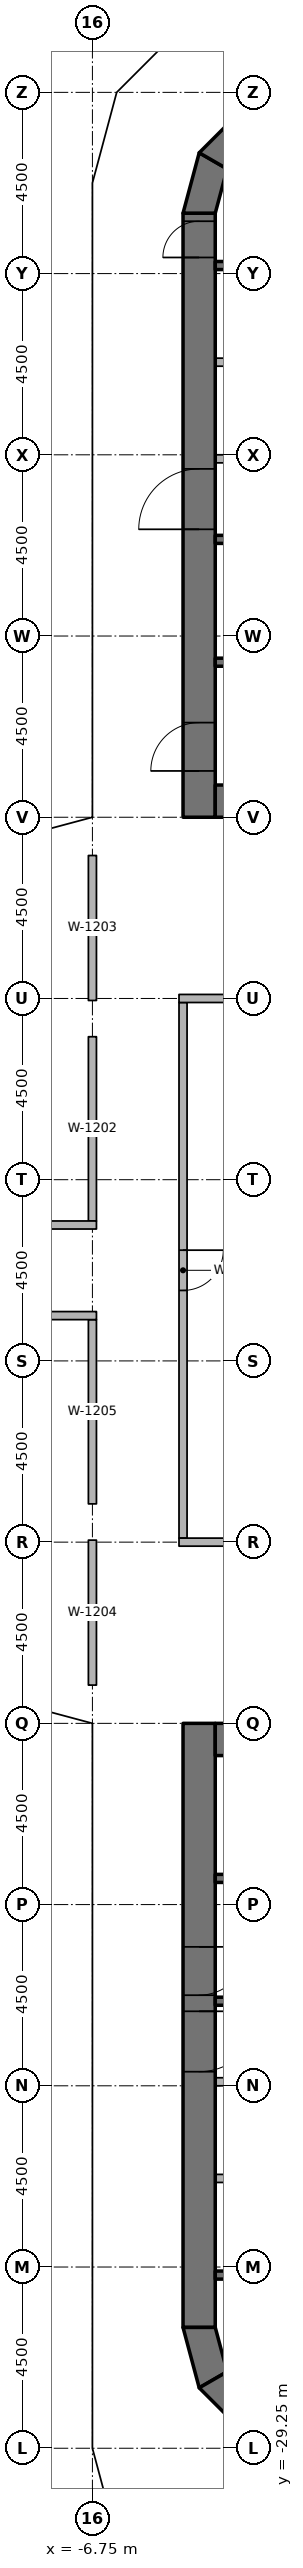
"""IFC4 building model, lengths in metres.
Left out: names, types, materials, properties, quantities, classifications, styles, units other than length and angle.
Written with IfcOpenShell. Run it as: python <this file> out.ifc"""

import sys

from ifc_helpers import new_model, si_unit, direction, frame, frame_2d, origin, origin_2d, place, context, subcontext, project, spatial, polyline, rectangle, outline, extrude, element, fill, save


model = new_model("IFC4")
c1 = context("Model", 3, precision=1e-05, world=origin(), true_north=direction((0.0, 1.0)))
c2 = subcontext(c1, "Body", "Model", "MODEL_VIEW")
j1 = project(units=[si_unit("LENGTHUNIT", "METRE"), si_unit("PLANEANGLEUNIT", "RADIAN")], contexts=[c1])
p1 = place(None, origin())
s1 = spatial("IfcSite", under=j1, at=p1, CompositionType="ELEMENT")
p2 = place(p1, origin())
s2 = spatial("IfcBuilding", under=s1, at=p2, CompositionType="ELEMENT")
p3 = place(p2, frame((0.0, 0.0, 128.4)))
s3 = spatial("IfcBuildingStorey", under=s2, at=p3, CompositionType="ELEMENT", Elevation=128.4)
for number, where, z_axis, x_axis in (
    (1, (-6.25, -26.9, 0.0), (0.0, 0.0, 1.0), (1.0, 0.0, 0.0)),
    (2, (-6.25, -24.65, 0.0), (0.0, 0.0, 1.0), (1.0, 0.0, 0.0)),
    (3, (-6.25, -20.25, 0.0), (0.0, 0.0, 1.0), (1.0, 0.0, 0.0)),
    (4, (-6.25, -15.75, 0.0), (0.0, 0.0, 1.0), (1.0, 0.0, 0.0)),
    (5, (-6.25, -10.75, 0.0), (0.0, 0.0, 1.0), (1.0, 0.0, 0.0)),
    (6, (-6.25, -6.25, 0.0), (0.0, 0.0, 1.0), (1.0, 0.0, 0.0)),
    (7, (-6.25, 6.25, 0.0), (0.0, 0.0, 1.0), (1.0, 0.0, 0.0)),
    (8, (-6.25, 10.75, 0.0), (0.0, 0.0, 1.0), (1.0, 0.0, 0.0)),
    (9, (-6.25, 15.75, 0.0), (0.0, 0.0, 1.0), (1.0, 0.0, 0.0)),
    (10, (-6.25, 20.25, 0.0), (0.0, 0.0, 1.0), (1.0, 0.0, 0.0)),
    (11, (-6.25, 24.65, 0.0), (0.0, 0.0, 1.0), (1.0, 0.0, 0.0)),
    (12, (-6.25, 26.7, 0.0), (0.0, 0.0, 1.0), (1.0, 0.0, 0.0)),
):
    element("IfcColumn", number, at=place(p3, frame(where, z_axis=z_axis, x_axis=x_axis)), inside=s3, PredefinedType="COLUMN", context=c2, shape_type="SweptSolid", body=[
        extrude(rectangle(XDim=0.9, YDim=0.9, at=origin_2d()), origin(), (0.0, 0.0, 1.0), 3.65),
    ])
p4 = place(p3, frame((-4.1, 11.25, 0.0), z_axis=(0.0, 0.0, 1.0), x_axis=(0.0, 1.0, 0.0)))
e13 = element("IfcWall", 13, at=p4, inside=s3, PredefinedType="SHEAR", context=c2, shape_type="SweptSolid", body=[
    extrude(rectangle(XDim=15.0, YDim=0.8, at=frame_2d((7.5, 0.0))), origin(), (0.0, 0.0, 1.0), 3.8),
])
p5 = place(p4, frame((7.15, 0.0, 0.0)))
e14 = element("IfcOpeningElement", 14, at=p5, cuts=e13, PredefinedType="OPENING", context=c2, shape_type="SweptSolid", body=[
    extrude(rectangle(XDim=1.5, YDim=2.3, at=frame_2d((0.75, 1.15))), frame((0.0, 0.41, 0.0), z_axis=(0.0, -1.0, 0.0), x_axis=(1.0, 0.0, 0.0)), (0.0, 0.0, 1.0), 0.82),
])
p6 = place(p4, frame((13.9, 0.0, 0.0)))
e15 = element("IfcOpeningElement", 15, at=p6, cuts=e13, PredefinedType="OPENING", context=c2, shape_type="SweptSolid", body=[
    extrude(rectangle(XDim=0.9, YDim=2.1, at=frame_2d((0.45, 1.05))), frame((0.0, 0.41, 0.0), z_axis=(0.0, -1.0, 0.0), x_axis=(1.0, 0.0, 0.0)), (0.0, 0.0, 1.0), 0.82),
])
p7 = place(p4, frame((1.15, 0.0, 0.0)))
e16 = element("IfcOpeningElement", 16, at=p7, cuts=e13, PredefinedType="OPENING", context=c2, shape_type="SweptSolid", body=[
    extrude(rectangle(XDim=1.2, YDim=2.1, at=frame_2d((0.6, 1.05))), frame((0.0, 0.41, 0.0), z_axis=(0.0, -1.0, 0.0), x_axis=(1.0, 0.0, 0.0)), (0.0, 0.0, 1.0), 0.82),
])
p8 = place(p3, frame((-3.7, 11.65, 0.0), z_axis=(0.0, 0.0, 1.0), x_axis=(1.0, 0.0, 0.0)))
e17 = element("IfcWall", 17, at=p8, inside=s3, PredefinedType="SHEAR", context=c2, shape_type="SweptSolid", body=[
    extrude(rectangle(XDim=7.4, YDim=0.8, at=frame_2d((3.7, 0.0))), origin(), (0.0, 0.0, 1.0), 3.8),
])
p9 = place(p3, origin())
e18 = element("IfcWall", 18, at=p9, inside=s3, PredefinedType="SHEAR", context=c2, shape_type="SweptSolid", body=[
    extrude(outline(polyline([(-4.5, 26.25), (-4.098, 27.75), (-3.405, 27.35), (-3.7, 26.25), (-4.5, 26.25)])), origin(), (0.0, 0.0, 1.0), 3.8),
])
p10 = place(p3, origin())
e19 = element("IfcWall", 19, at=p10, inside=s3, PredefinedType="SHEAR", context=c2, shape_type="SweptSolid", body=[
    extrude(outline(polyline([(-4.098, 27.75), (-3.0, 28.848), (-2.6, 28.155), (-3.405, 27.35), (-4.098, 27.75)])), origin(), (0.0, 0.0, 1.0), 3.8),
])
p11 = place(p3, frame((-4.1, -11.25, 0.0), z_axis=(0.0, 0.0, 1.0), x_axis=(0.0, -1.0, 0.0)))
e20 = element("IfcWall", 20, at=p11, inside=s3, PredefinedType="SHEAR", context=c2, shape_type="SweptSolid", body=[
    extrude(rectangle(XDim=15.0, YDim=0.8, at=frame_2d((7.5, 0.0))), origin(), (0.0, 0.0, 1.0), 3.8),
])
p12 = place(p11, frame((7.15, 0.0, 0.0)))
e21 = element("IfcOpeningElement", 21, at=p12, cuts=e20, PredefinedType="OPENING", context=c2, shape_type="SweptSolid", body=[
    extrude(rectangle(XDim=1.5, YDim=2.3, at=frame_2d((0.75, 1.15))), frame((0.0, 0.41, 0.0), z_axis=(0.0, -1.0, 0.0), x_axis=(1.0, 0.0, 0.0)), (0.0, 0.0, 1.0), 0.82),
])
p13 = place(p11, frame((5.55, 0.0, 0.0)))
e22 = element("IfcOpeningElement", 22, at=p13, cuts=e20, PredefinedType="OPENING", context=c2, shape_type="SweptSolid", body=[
    extrude(rectangle(XDim=1.2, YDim=2.1, at=frame_2d((0.6, 1.05))), frame((0.0, 0.41, 0.0), z_axis=(0.0, -1.0, 0.0), x_axis=(1.0, 0.0, 0.0)), (0.0, 0.0, 1.0), 0.82),
])
p14 = place(p3, frame((-3.7, -11.65, 0.0), z_axis=(0.0, 0.0, 1.0), x_axis=(1.0, 0.0, 0.0)))
e23 = element("IfcWall", 23, at=p14, inside=s3, PredefinedType="SHEAR", context=c2, shape_type="SweptSolid", body=[
    extrude(rectangle(XDim=7.4, YDim=0.8, at=frame_2d((3.7, 0.0))), origin(), (0.0, 0.0, 1.0), 3.8),
])
p15 = place(p3, origin())
e24 = element("IfcWall", 24, at=p15, inside=s3, PredefinedType="SHEAR", context=c2, shape_type="SweptSolid", body=[
    extrude(outline(polyline([(-4.5, -26.25), (-4.098, -27.75), (-3.405, -27.35), (-3.7, -26.25), (-4.5, -26.25)])), origin(), (0.0, 0.0, 1.0), 3.8),
])
p16 = place(p3, origin())
e25 = element("IfcWall", 25, at=p16, inside=s3, PredefinedType="SHEAR", context=c2, shape_type="SweptSolid", body=[
    extrude(outline(polyline([(-4.098, -27.75), (-3.0, -28.848), (-2.6, -28.155), (-3.405, -27.35), (-4.098, -27.75)])), origin(), (0.0, 0.0, 1.0), 3.8),
])
for number, where, z_axis, x_axis in (
    (26, (-3.7, 24.95, 0.0), (0.0, 0.0, 1.0), (1.0, 0.0, 0.0)),
    (27, (-3.7, 18.15, 0.0), (0.0, 0.0, 1.0), (1.0, 0.0, 0.0)),
    (28, (-3.7, 15.1, 0.0), (0.0, 0.0, 1.0), (1.0, 0.0, 0.0)),
):
    element("IfcWall", number, at=place(p3, frame(where, z_axis=z_axis, x_axis=x_axis)), inside=s3, PredefinedType="SHEAR", context=c2, shape_type="SweptSolid", body=[
        extrude(rectangle(XDim=7.4, YDim=0.2, at=frame_2d((3.7, 0.0))), origin(), (0.0, 0.0, 1.0), 3.65),
    ])
p17 = place(p3, frame((-3.7, 20.15, 0.0), z_axis=(0.0, 0.0, 1.0), x_axis=(1.0, 0.0, 0.0)))
e29 = element("IfcWall", 29, at=p17, inside=s3, PredefinedType="PARTITIONING", context=c2, shape_type="SweptSolid", body=[
    extrude(rectangle(XDim=2.8, YDim=0.2, at=frame_2d((1.4, 0.0))), origin(), (0.0, 0.0, 1.0), 3.65),
])
p18 = place(p3, frame((-3.7, 22.55, 0.0), z_axis=(0.0, 0.0, 1.0), x_axis=(1.0, 0.0, 0.0)))
e30 = element("IfcWall", 30, at=p18, inside=s3, PredefinedType="PARTITIONING", context=c2, shape_type="SweptSolid", body=[
    extrude(rectangle(XDim=2.6, YDim=0.2, at=frame_2d((1.3, 0.0))), origin(), (0.0, 0.0, 1.0), 3.65),
])
for number, where, z_axis, x_axis in (
    (31, (3.7, -24.95, 0.0), (0.0, 0.0, 1.0), (-1.0, 0.0, 0.0)),
    (32, (3.7, -18.15, 0.0), (0.0, 0.0, 1.0), (-1.0, 0.0, 0.0)),
    (33, (3.7, -15.1, 0.0), (0.0, 0.0, 1.0), (-1.0, 0.0, 0.0)),
):
    element("IfcWall", number, at=place(p3, frame(where, z_axis=z_axis, x_axis=x_axis)), inside=s3, PredefinedType="SHEAR", context=c2, shape_type="SweptSolid", body=[
        extrude(rectangle(XDim=7.4, YDim=0.2, at=frame_2d((3.7, 0.0))), origin(), (0.0, 0.0, 1.0), 3.65),
    ])
p19 = place(p3, frame((-0.9, -20.15, 0.0), z_axis=(0.0, 0.0, 1.0), x_axis=(-1.0, 0.0, 0.0)))
e34 = element("IfcWall", 34, at=p19, inside=s3, PredefinedType="PARTITIONING", context=c2, shape_type="SweptSolid", body=[
    extrude(rectangle(XDim=2.8, YDim=0.2, at=frame_2d((1.4, 0.0))), origin(), (0.0, 0.0, 1.0), 3.65),
])
p20 = place(p3, frame((-1.1, -22.55, 0.0), z_axis=(0.0, 0.0, 1.0), x_axis=(-1.0, 0.0, 0.0)))
e35 = element("IfcWall", 35, at=p20, inside=s3, PredefinedType="PARTITIONING", context=c2, shape_type="SweptSolid", body=[
    extrude(rectangle(XDim=2.6, YDim=0.2, at=frame_2d((1.3, 0.0))), origin(), (0.0, 0.0, 1.0), 3.65),
])
p21 = place(p3, frame((-4.5, 6.65, 0.0), z_axis=(0.0, 0.0, 1.0), x_axis=(0.0, -1.0, 0.0)))
e36 = element("IfcWall", 36, at=p21, inside=s3, PredefinedType="PARTITIONING", context=c2, shape_type="SweptSolid", body=[
    extrude(rectangle(XDim=13.3, YDim=0.2, at=frame_2d((6.65, 0.0))), origin(), (0.0, 0.0, 1.0), 2.738),
])
p22 = place(p21, frame((6.15, 0.0, 0.0)))
e37 = element("IfcOpeningElement", 37, at=p22, cuts=e36, PredefinedType="OPENING", context=c2, shape_type="SweptSolid", body=[
    extrude(rectangle(XDim=1.0, YDim=2.1, at=frame_2d((0.5, 1.05))), frame((0.0, 0.11, 0.0), z_axis=(0.0, -1.0, 0.0), x_axis=(1.0, 0.0, 0.0)), (0.0, 0.0, 1.0), 0.22),
])
p23 = place(p3, frame((-6.75, 1.225, 0.0), z_axis=(0.0, 0.0, 1.0), x_axis=(0.0, 1.0, 0.0)))
e38 = element("IfcWall", 38, at=p23, inside=s3, PredefinedType="PARTITIONING", context=c2, shape_type="SweptSolid", body=[
    extrude(rectangle(XDim=4.575, YDim=0.2, at=frame_2d((2.288, 0.0))), origin(), (0.0, 0.0, 1.0), 2.738),
])
for number, where, z_axis, x_axis in (
    (39, (-6.75, 6.7, 0.0), (0.0, 0.0, 1.0), (0.0, 1.0, 0.0)),
    (40, (-6.75, -10.3, 0.0), (0.0, 0.0, 1.0), (0.0, 1.0, 0.0)),
):
    element("IfcWall", number, at=place(p3, frame(where, z_axis=z_axis, x_axis=x_axis)), inside=s3, PredefinedType="PARTITIONING", context=c2, shape_type="SweptSolid", body=[
        extrude(rectangle(XDim=3.6, YDim=0.2, at=frame_2d((1.8, 0.0))), origin(), (0.0, 0.0, 1.0), 2.738),
    ])
p24 = place(p3, frame((-6.75, -5.8, 0.0), z_axis=(0.0, 0.0, 1.0), x_axis=(0.0, 1.0, 0.0)))
e41 = element("IfcWall", 41, at=p24, inside=s3, PredefinedType="PARTITIONING", context=c2, shape_type="SweptSolid", body=[
    extrude(rectangle(XDim=4.575, YDim=0.2, at=frame_2d((2.288, 0.0))), origin(), (0.0, 0.0, 1.0), 2.738),
])
for number, where, z_axis, x_axis in (
    (42, (-4.6, 6.75, 0.0), (0.0, 0.0, 1.0), (1.0, 0.0, 0.0)),
    (43, (-4.6, -6.75, 0.0), (0.0, 0.0, 1.0), (1.0, 0.0, 0.0)),
):
    element("IfcWall", number, at=place(p3, frame(where, z_axis=z_axis, x_axis=x_axis)), inside=s3, PredefinedType="PARTITIONING", context=c2, shape_type="SweptSolid", body=[
        extrude(rectangle(XDim=4.7, YDim=0.2, at=frame_2d((2.35, 0.0))), origin(), (0.0, 0.0, 1.0), 2.738),
    ])
p25 = place(p3, frame((-11.35, 1.125, 0.0), z_axis=(0.0, 0.0, 1.0), x_axis=(1.0, 0.0, 0.0)))
e44 = element("IfcWall", 44, at=p25, inside=s3, PredefinedType="PARTITIONING", context=c2, shape_type="SweptSolid", body=[
    extrude(rectangle(XDim=4.7, YDim=0.2, at=frame_2d((2.35, 0.0))), origin(), (0.0, 0.0, 1.0), 2.738),
])
p26 = place(p25, frame((1.85, 0.0, 0.0)))
e45 = element("IfcOpeningElement", 45, at=p26, cuts=e44, PredefinedType="OPENING", context=c2, shape_type="SweptSolid", body=[
    extrude(rectangle(XDim=1.0, YDim=2.1, at=frame_2d((0.5, 1.05))), frame((0.0, 0.11, 0.0), z_axis=(0.0, -1.0, 0.0), x_axis=(1.0, 0.0, 0.0)), (0.0, 0.0, 1.0), 0.22),
])
p27 = place(p3, frame((-6.65, -1.125, 0.0), z_axis=(0.0, 0.0, 1.0), x_axis=(-1.0, 0.0, 0.0)))
e46 = element("IfcWall", 46, at=p27, inside=s3, PredefinedType="PARTITIONING", context=c2, shape_type="SweptSolid", body=[
    extrude(rectangle(XDim=4.7, YDim=0.2, at=frame_2d((2.35, 0.0))), origin(), (0.0, 0.0, 1.0), 2.738),
])
p28 = place(p27, frame((1.85, 0.0, 0.0)))
e47 = element("IfcOpeningElement", 47, at=p28, cuts=e46, PredefinedType="OPENING", context=c2, shape_type="SweptSolid", body=[
    extrude(rectangle(XDim=1.0, YDim=2.1, at=frame_2d((0.5, 1.05))), frame((0.0, 0.11, 0.0), z_axis=(0.0, -1.0, 0.0), x_axis=(1.0, 0.0, 0.0)), (0.0, 0.0, 1.0), 0.22),
])
p29 = place(p5, origin())
e48 = element("IfcDoor", 48, at=p29, inside=s3, OperationType="DOUBLE_DOOR_SINGLE_SWING", PredefinedType="DOOR", context=c2, shape_type="SweptSolid", body=[
    extrude(rectangle(XDim=1.5, YDim=2.3, at=frame_2d((0.75, 1.15))), frame((0.0, 0.025, 0.0), z_axis=(0.0, -1.0, 0.0), x_axis=(1.0, 0.0, 0.0)), (0.0, 0.0, 1.0), 0.05),
])
fill(e14, e48)
p30 = place(p6, origin())
e49 = element("IfcDoor", 49, at=p30, inside=s3, OperationType="SINGLE_SWING_LEFT", PredefinedType="DOOR", context=c2, shape_type="SweptSolid", body=[
    extrude(rectangle(XDim=0.9, YDim=2.1, at=frame_2d((0.45, 1.05))), frame((0.0, 0.025, 0.0), z_axis=(0.0, -1.0, 0.0), x_axis=(1.0, 0.0, 0.0)), (0.0, 0.0, 1.0), 0.05),
])
fill(e15, e49)
p31 = place(p7, origin())
e50 = element("IfcDoor", 50, at=p31, inside=s3, OperationType="SINGLE_SWING_LEFT", PredefinedType="DOOR", context=c2, shape_type="SweptSolid", body=[
    extrude(rectangle(XDim=1.2, YDim=2.1, at=frame_2d((0.6, 1.05))), frame((0.0, 0.025, 0.0), z_axis=(0.0, -1.0, 0.0), x_axis=(1.0, 0.0, 0.0)), (0.0, 0.0, 1.0), 0.05),
])
fill(e16, e50)
p32 = place(p12, origin())
e51 = element("IfcDoor", 51, at=p32, inside=s3, OperationType="DOUBLE_DOOR_SINGLE_SWING", PredefinedType="DOOR", context=c2, shape_type="SweptSolid", body=[
    extrude(rectangle(XDim=1.5, YDim=2.3, at=frame_2d((0.75, 1.15))), frame((0.0, 0.025, 0.0), z_axis=(0.0, -1.0, 0.0), x_axis=(1.0, 0.0, 0.0)), (0.0, 0.0, 1.0), 0.05),
])
fill(e21, e51)
p33 = place(p13, origin())
e52 = element("IfcDoor", 52, at=p33, inside=s3, OperationType="SINGLE_SWING_LEFT", PredefinedType="DOOR", context=c2, shape_type="SweptSolid", body=[
    extrude(rectangle(XDim=1.2, YDim=2.1, at=frame_2d((0.6, 1.05))), frame((0.0, 0.025, 0.0), z_axis=(0.0, -1.0, 0.0), x_axis=(1.0, 0.0, 0.0)), (0.0, 0.0, 1.0), 0.05),
])
fill(e22, e52)
p34 = place(p22, origin())
e53 = element("IfcDoor", 53, at=p34, inside=s3, OperationType="SINGLE_SWING_RIGHT", PredefinedType="DOOR", context=c2, shape_type="SweptSolid", body=[
    extrude(rectangle(XDim=1.0, YDim=2.1, at=frame_2d((0.5, 1.05))), frame((0.0, 0.025, 0.0), z_axis=(0.0, -1.0, 0.0), x_axis=(1.0, 0.0, 0.0)), (0.0, 0.0, 1.0), 0.05),
])
fill(e37, e53)
save(model, sys.argv[1])
